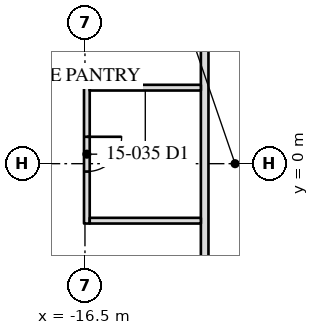
"""IFC4 building model, lengths in metres.
Left out: names, types, materials, properties, quantities, classifications, styles, units other than length and angle.
Written with IfcOpenShell. Run it as: python <this file> out.ifc"""

import sys

from ifc_helpers import new_model, si_unit, direction, frame, frame_2d, origin, place, context, subcontext, project, spatial, rectangle, extrude, element, fill, save


model = new_model("IFC4")
c1 = context("Model", 3, precision=1e-05, world=origin(), true_north=direction((0.0, 1.0)))
c2 = subcontext(c1, "Body", "Model", "MODEL_VIEW")
j1 = project(units=[si_unit("LENGTHUNIT", "METRE"), si_unit("PLANEANGLEUNIT", "RADIAN")], contexts=[c1])
p1 = place(None, origin())
s1 = spatial("IfcSite", under=j1, at=p1, CompositionType="ELEMENT")
p2 = place(p1, origin())
s2 = spatial("IfcBuilding", under=s1, at=p2, CompositionType="ELEMENT")
p3 = place(p2, frame((0.0, 0.0, 65.2)))
s3 = spatial("IfcBuildingStorey", under=s2, at=p3, CompositionType="ELEMENT", Elevation=65.2)
p4 = place(p3, frame((-13.35, 13.45, 0.0), z_axis=(0.0, 0.0, 1.0), x_axis=(0.0, -1.0, 0.0)))
e1 = element("IfcWall", 1, at=p4, inside=s3, PredefinedType="PARTITIONING", context=c2, shape_type="SweptSolid", body=[
    extrude(rectangle(XDim=26.7, YDim=0.2, at=frame_2d((13.35, 0.0))), origin(), (0.0, 0.0, 1.0), 3.91),
])
p5 = place(p4, frame((5.992, 0.0, 0.0)))
e2 = element("IfcOpeningElement", 2, at=p5, cuts=e1, PredefinedType="OPENING", context=c2, shape_type="SweptSolid", body=[
    extrude(rectangle(XDim=0.915, YDim=2.134, at=frame_2d((0.458, 1.067))), frame((0.0, 0.11, 0.0), z_axis=(0.0, -1.0, 0.0), x_axis=(1.0, 0.0, 0.0)), (0.0, 0.0, 1.0), 0.22),
])
p6 = place(p3, frame((-16.45, 2.075, 0.0), z_axis=(0.0, 0.0, 1.0), x_axis=(0.0, -1.0, 0.0)))
e3 = element("IfcWall", 3, at=p6, inside=s3, PredefinedType="PARTITIONING", context=c2, shape_type="SweptSolid", body=[
    extrude(rectangle(XDim=3.65, YDim=0.15, at=frame_2d((1.825, 0.0))), origin(), (0.0, 0.0, 1.0), 3.91),
])
p7 = place(p6, frame((1.367, 0.0, 0.0)))
e4 = element("IfcOpeningElement", 4, at=p7, cuts=e3, PredefinedType="OPENING", context=c2, shape_type="SweptSolid", body=[
    extrude(rectangle(XDim=0.915, YDim=2.134, at=frame_2d((0.458, 1.067))), frame((0.0, 0.085, 0.0), z_axis=(0.0, -1.0, 0.0), x_axis=(1.0, 0.0, 0.0)), (0.0, 0.0, 1.0), 0.17),
])
for number, where, z_axis, x_axis in (
    (5, (-16.375, 2.0, 0.0), (0.0, 0.0, 1.0), (1.0, 0.0, 0.0)),
    (6, (-16.375, -1.5, 0.0), (0.0, 0.0, 1.0), (1.0, 0.0, 0.0)),
):
    element("IfcWall", number, at=place(p3, frame(where, z_axis=z_axis, x_axis=x_axis)), inside=s3, PredefinedType="PARTITIONING", context=c2, shape_type="SweptSolid", body=[
        extrude(rectangle(XDim=2.925, YDim=0.15, at=frame_2d((1.462, 0.0))), origin(), (0.0, 0.0, 1.0), 3.91),
    ])
p8 = place(p7, origin())
e7 = element("IfcDoor", 7, at=p8, inside=s3, OperationType="SINGLE_SWING_LEFT", PredefinedType="DOOR", context=c2, shape_type="SweptSolid", body=[
    extrude(rectangle(XDim=0.915, YDim=2.134, at=frame_2d((0.458, 1.067))), frame((0.0, 0.025, 0.0), z_axis=(0.0, -1.0, 0.0), x_axis=(1.0, 0.0, 0.0)), (0.0, 0.0, 1.0), 0.05),
])
fill(e4, e7)
save(model, sys.argv[1])
